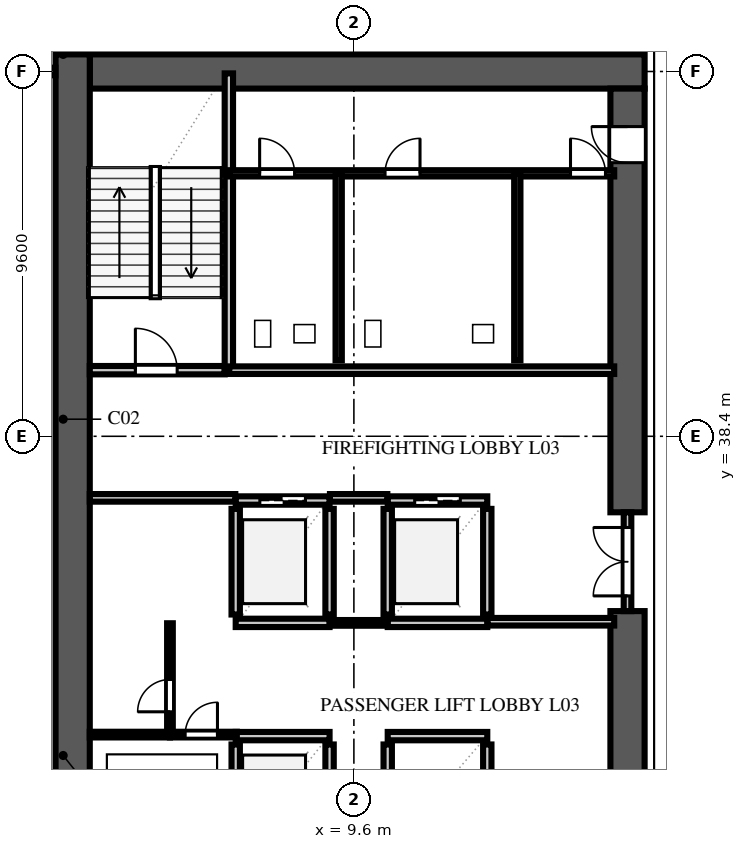
"""IFC4 building model, lengths in metres.
Left out: names, types, materials, properties, quantities, classifications, styles, units other than length and angle.
Written with IfcOpenShell. Run it as: python <this file> out.ifc"""

import sys

from ifc_helpers import new_model, si_unit, direction, frame, frame_2d, origin, place, context, subcontext, project, spatial, rectangle, extrude, element, fill, save


model = new_model("IFC4")
c1 = context("Model", 3, precision=1e-05, world=origin(), true_north=direction((0.0, 1.0)))
c2 = subcontext(c1, "Body", "Model", "MODEL_VIEW")
j1 = project(units=[si_unit("LENGTHUNIT", "METRE"), si_unit("PLANEANGLEUNIT", "RADIAN")], contexts=[c1])
p1 = place(None, origin())
s1 = spatial("IfcSite", under=j1, at=p1, CompositionType="ELEMENT")
p2 = place(p1, origin())
s2 = spatial("IfcBuilding", under=s1, at=p2, CompositionType="ELEMENT")
p3 = place(p2, frame((0.0, 0.0, 15.0)))
s3 = spatial("IfcBuildingStorey", under=s2, at=p3, CompositionType="ELEMENT", Elevation=15.0)
p4 = place(p3, frame((2.65, 48.0, 0.0), z_axis=(0.0, 0.0, 1.0), x_axis=(1.0, 0.0, 0.0)))
e1 = element("IfcWall", 1, at=p4, inside=s3, PredefinedType="SHEAR", context=c2, shape_type="SweptSolid", body=[
    extrude(rectangle(XDim=14.6, YDim=0.9, at=frame_2d((7.3, 0.0))), origin(), (0.0, 0.0, 1.0), 4.26),
])
p5 = place(p3, frame((2.2, 9.15, 0.0), z_axis=(0.0, 0.0, 1.0), x_axis=(0.0, 1.0, 0.0)))
e2 = element("IfcWall", 2, at=p5, inside=s3, PredefinedType="SHEAR", context=c2, shape_type="SweptSolid", body=[
    extrude(rectangle(XDim=39.3, YDim=0.9, at=frame_2d((19.65, 0.0))), origin(), (0.0, 0.0, 1.0), 4.26),
])
p6 = place(p3, frame((16.8, 26.0, 0.0), z_axis=(0.0, 0.0, 1.0), x_axis=(0.0, 1.0, 0.0)))
e3 = element("IfcWall", 3, at=p6, inside=s3, PredefinedType="SHEAR", context=c2, shape_type="SweptSolid", body=[
    extrude(rectangle(XDim=7.8, YDim=0.9, at=frame_2d((3.9, 0.0))), origin(), (0.0, 0.0, 1.0), 4.26),
])
p7 = place(p3, frame((16.8, 36.4, 0.0), z_axis=(0.0, 0.0, 1.0), x_axis=(0.0, 1.0, 0.0)))
e4 = element("IfcWall", 4, at=p7, inside=s3, PredefinedType="SHEAR", context=c2, shape_type="SweptSolid", body=[
    extrude(rectangle(XDim=11.15, YDim=0.9, at=frame_2d((5.575, 0.0))), origin(), (0.0, 0.0, 1.0), 4.26),
])
p8 = place(p7, frame((9.2, 0.0, 0.0)))
e5 = element("IfcOpeningElement", 5, at=p8, cuts=e4, PredefinedType="OPENING", context=c2, shape_type="SweptSolid", body=[
    extrude(rectangle(XDim=0.95, YDim=2.15, at=frame_2d((0.475, 1.075))), frame((0.0, 0.462, 0.0), z_axis=(0.0, -1.0, 0.0), x_axis=(1.0, 0.0, 0.0)), (0.0, 0.0, 1.0), 0.924),
])
p9 = place(p3, frame((2.65, 40.14, 0.0), z_axis=(0.0, 0.0, 1.0), x_axis=(1.0, 0.0, 0.0)))
e6 = element("IfcWall", 6, at=p9, inside=s3, PredefinedType="SOLIDWALL", context=c2, shape_type="SweptSolid", body=[
    extrude(rectangle(XDim=3.55, YDim=0.22, at=frame_2d((1.775, 0.0))), origin(), (0.0, 0.0, 1.0), 4.26),
])
p10 = place(p9, frame((1.2, 0.0, 0.0)))
e7 = element("IfcOpeningElement", 7, at=p10, cuts=e6, PredefinedType="OPENING", context=c2, shape_type="SweptSolid", body=[
    extrude(rectangle(XDim=1.1, YDim=2.2, at=frame_2d((0.55, 1.1))), frame((0.0, 0.122, 0.0), z_axis=(0.0, -1.0, 0.0), x_axis=(1.0, 0.0, 0.0)), (0.0, 0.0, 1.0), 0.244),
])
p11 = place(p3, frame((6.31, 40.14, 0.0), z_axis=(0.0, 0.0, 1.0), x_axis=(0.0, 1.0, 0.0)))
e8 = element("IfcWall", 8, at=p11, inside=s3, PredefinedType="SOLIDWALL", context=c2, shape_type="SweptSolid", body=[
    extrude(rectangle(XDim=7.81, YDim=0.22, at=frame_2d((3.905, 0.0))), origin(), (0.0, 0.0, 1.0), 4.26),
])
p12 = place(p3, frame((6.49, 27.71, 0.0), z_axis=(0.0, 0.0, 1.0), x_axis=(0.0, 1.0, 0.0)))
e9 = element("IfcWall", 9, at=p12, inside=s3, PredefinedType="SOLIDWALL", context=c2, shape_type="SweptSolid", body=[
    extrude(rectangle(XDim=2.58, YDim=0.22, at=frame_2d((1.29, 0.0))), origin(), (0.0, 0.0, 1.0), 4.26),
])
p13 = place(p3, frame((8.96, 27.71, 0.0), z_axis=(0.0, 0.0, 1.0), x_axis=(0.0, 1.0, 0.0)))
e10 = element("IfcWall", 10, at=p13, inside=s3, PredefinedType="SOLIDWALL", context=c2, shape_type="SweptSolid", body=[
    extrude(rectangle(XDim=2.58, YDim=0.22, at=frame_2d((1.29, 0.0))), origin(), (0.0, 0.0, 1.0), 4.26),
])
p14 = place(p13, frame((0.74, 0.0, 0.0)))
e11 = element("IfcOpeningElement", 11, at=p14, cuts=e10, PredefinedType="OPENING", context=c2, shape_type="SweptSolid", body=[
    extrude(rectangle(XDim=1.1, YDim=2.2, at=frame_2d((0.55, 1.1))), frame((0.0, 0.122, 0.0), z_axis=(0.0, -1.0, 0.0), x_axis=(1.0, 0.0, 0.0)), (0.0, 0.0, 1.0), 0.244),
])
p15 = place(p3, frame((6.49, 30.51, 0.0), z_axis=(0.0, 0.0, 1.0), x_axis=(1.0, 0.0, 0.0)))
e12 = element("IfcWall", 12, at=p15, inside=s3, PredefinedType="SOLIDWALL", context=c2, shape_type="SweptSolid", body=[
    extrude(rectangle(XDim=2.47, YDim=0.22, at=frame_2d((1.235, 0.0))), origin(), (0.0, 0.0, 1.0), 4.26),
])
for number, where, z_axis, x_axis in (
    (13, (10.49, 27.71, 0.0), (0.0, 0.0, 1.0), (0.0, 1.0, 0.0)),
    (14, (13.11, 27.71, 0.0), (0.0, 0.0, 1.0), (0.0, 1.0, 0.0)),
):
    element("IfcWall", number, at=place(p3, frame(where, z_axis=z_axis, x_axis=x_axis)), inside=s3, PredefinedType="SOLIDWALL", context=c2, shape_type="SweptSolid", body=[
        extrude(rectangle(XDim=2.58, YDim=0.22, at=frame_2d((1.29, 0.0))), origin(), (0.0, 0.0, 1.0), 4.26),
    ])
p16 = place(p3, frame((10.49, 30.51, 0.0), z_axis=(0.0, 0.0, 1.0), x_axis=(1.0, 0.0, 0.0)))
e15 = element("IfcWall", 15, at=p16, inside=s3, PredefinedType="SOLIDWALL", context=c2, shape_type="SweptSolid", body=[
    extrude(rectangle(XDim=2.62, YDim=0.22, at=frame_2d((1.31, 0.0))), origin(), (0.0, 0.0, 1.0), 4.26),
])
for number, where, z_axis, x_axis in (
    (16, (6.49, 33.71, 0.0), (0.0, 0.0, 1.0), (0.0, 1.0, 0.0)),
    (17, (8.96, 33.71, 0.0), (0.0, 0.0, 1.0), (0.0, 1.0, 0.0)),
):
    element("IfcWall", number, at=place(p3, frame(where, z_axis=z_axis, x_axis=x_axis)), inside=s3, PredefinedType="SOLIDWALL", context=c2, shape_type="SweptSolid", body=[
        extrude(rectangle(XDim=2.78, YDim=0.22, at=frame_2d((1.39, 0.0))), origin(), (0.0, 0.0, 1.0), 4.26),
    ])
p17 = place(p3, frame((6.49, 33.49, 0.0), z_axis=(0.0, 0.0, 1.0), x_axis=(1.0, 0.0, 0.0)))
e18 = element("IfcWall", 18, at=p17, inside=s3, PredefinedType="SOLIDWALL", context=c2, shape_type="SweptSolid", body=[
    extrude(rectangle(XDim=2.47, YDim=0.22, at=frame_2d((1.235, 0.0))), origin(), (0.0, 0.0, 1.0), 4.26),
])
p18 = place(p3, frame((6.49, 36.71, 0.0), z_axis=(0.0, 0.0, 1.0), x_axis=(1.0, 0.0, 0.0)))
e19 = element("IfcWall", 19, at=p18, inside=s3, PredefinedType="SOLIDWALL", context=c2, shape_type="SweptSolid", body=[
    extrude(rectangle(XDim=2.47, YDim=0.22, at=frame_2d((1.235, 0.0))), origin(), (0.0, 0.0, 1.0), 4.26),
])
p19 = place(p18, frame((0.635, 0.0, 0.0)))
e20 = element("IfcOpeningElement", 20, at=p19, cuts=e19, PredefinedType="OPENING", context=c2, shape_type="SweptSolid", body=[
    extrude(rectangle(XDim=1.2, YDim=2.2, at=frame_2d((0.6, 1.1))), frame((0.0, 0.122, 0.0), z_axis=(0.0, -1.0, 0.0), x_axis=(1.0, 0.0, 0.0)), (0.0, 0.0, 1.0), 0.244),
])
for number, where, z_axis, x_axis in (
    (21, (10.49, 33.71, 0.0), (0.0, 0.0, 1.0), (0.0, 1.0, 0.0)),
    (22, (13.11, 33.71, 0.0), (0.0, 0.0, 1.0), (0.0, 1.0, 0.0)),
):
    element("IfcWall", number, at=place(p3, frame(where, z_axis=z_axis, x_axis=x_axis)), inside=s3, PredefinedType="SOLIDWALL", context=c2, shape_type="SweptSolid", body=[
        extrude(rectangle(XDim=2.78, YDim=0.22, at=frame_2d((1.39, 0.0))), origin(), (0.0, 0.0, 1.0), 4.26),
    ])
p20 = place(p3, frame((10.49, 33.49, 0.0), z_axis=(0.0, 0.0, 1.0), x_axis=(1.0, 0.0, 0.0)))
e23 = element("IfcWall", 23, at=p20, inside=s3, PredefinedType="SOLIDWALL", context=c2, shape_type="SweptSolid", body=[
    extrude(rectangle(XDim=2.62, YDim=0.22, at=frame_2d((1.31, 0.0))), origin(), (0.0, 0.0, 1.0), 4.26),
])
p21 = place(p3, frame((10.49, 36.71, 0.0), z_axis=(0.0, 0.0, 1.0), x_axis=(1.0, 0.0, 0.0)))
e24 = element("IfcWall", 24, at=p21, inside=s3, PredefinedType="SOLIDWALL", context=c2, shape_type="SweptSolid", body=[
    extrude(rectangle(XDim=2.62, YDim=0.22, at=frame_2d((1.31, 0.0))), origin(), (0.0, 0.0, 1.0), 4.26),
])
p22 = place(p21, frame((0.71, 0.0, 0.0)))
e25 = element("IfcOpeningElement", 25, at=p22, cuts=e24, PredefinedType="OPENING", context=c2, shape_type="SweptSolid", body=[
    extrude(rectangle(XDim=1.2, YDim=2.2, at=frame_2d((0.6, 1.1))), frame((0.0, 0.122, 0.0), z_axis=(0.0, -1.0, 0.0), x_axis=(1.0, 0.0, 0.0)), (0.0, 0.0, 1.0), 0.244),
])
p23 = place(p3, frame((2.65, 36.78, 0.0), z_axis=(0.0, 0.0, 1.0), x_axis=(1.0, 0.0, 0.0)))
e26 = element("IfcWall", 26, at=p23, inside=s3, PredefinedType="SOLIDWALL", context=c2, shape_type="SweptSolid", body=[
    extrude(rectangle(XDim=3.83, YDim=0.2, at=frame_2d((1.915, 0.0))), origin(), (0.0, 0.0, 1.0), 4.26),
])
p24 = place(p3, frame((8.97, 36.78, 0.0), z_axis=(0.0, 0.0, 1.0), x_axis=(1.0, 0.0, 0.0)))
e27 = element("IfcWall", 27, at=p24, inside=s3, PredefinedType="SOLIDWALL", context=c2, shape_type="SweptSolid", body=[
    extrude(rectangle(XDim=1.51, YDim=0.2, at=frame_2d((0.755, 0.0))), origin(), (0.0, 0.0, 1.0), 4.26),
])
p25 = place(p3, frame((13.12, 33.52, 0.0), z_axis=(0.0, 0.0, 1.0), x_axis=(1.0, 0.0, 0.0)))
e28 = element("IfcWall", 28, at=p25, inside=s3, PredefinedType="SOLIDWALL", context=c2, shape_type="SweptSolid", body=[
    extrude(rectangle(XDim=3.33, YDim=0.2, at=frame_2d((1.665, 0.0))), origin(), (0.0, 0.0, 1.0), 4.26),
])
p26 = place(p3, frame((6.32, 40.14, 0.0), z_axis=(0.0, 0.0, 1.0), x_axis=(1.0, 0.0, 0.0)))
e29 = element("IfcWall", 29, at=p26, inside=s3, PredefinedType="SOLIDWALL", context=c2, shape_type="SweptSolid", body=[
    extrude(rectangle(XDim=10.13, YDim=0.2, at=frame_2d((5.065, 0.0))), origin(), (0.0, 0.0, 1.0), 4.26),
])
p27 = place(p3, frame((16.8, 33.8, 0.0), z_axis=(0.0, 0.0, 1.0), x_axis=(0.0, 1.0, 0.0)))
e30 = element("IfcWall", 30, at=p27, inside=s3, PredefinedType="SOLIDWALL", context=c2, shape_type="SweptSolid", body=[
    extrude(rectangle(XDim=2.6, YDim=0.2, at=frame_2d((1.3, 0.0))), origin(), (0.0, 0.0, 1.0), 4.26),
])
p28 = place(p27, frame((0.4, 0.0, 0.0)))
e31 = element("IfcOpeningElement", 31, at=p28, cuts=e30, PredefinedType="OPENING", context=c2, shape_type="SweptSolid", body=[
    extrude(rectangle(XDim=1.8, YDim=2.2, at=frame_2d((0.9, 1.1))), frame((0.0, 0.112, 0.0), z_axis=(0.0, -1.0, 0.0), x_axis=(1.0, 0.0, 0.0)), (0.0, 0.0, 1.0), 0.224),
])
p29 = place(p3, frame((8.965, 33.49, 0.0), z_axis=(0.0, 0.0, 1.0), x_axis=(1.0, 0.0, 0.0)))
e32 = element("IfcWall", 32, at=p29, inside=s3, PredefinedType="PARTITIONING", context=c2, shape_type="SweptSolid", body=[
    extrude(rectangle(XDim=1.52, YDim=0.15, at=frame_2d((0.76, 0.0))), origin(), (0.0, 0.0, 1.0), 4.26),
])
p30 = place(p3, frame((4.76, 30.55, 0.0), z_axis=(0.0, 0.0, 1.0), x_axis=(0.0, 1.0, 0.0)))
e33 = element("IfcWall", 33, at=p30, inside=s3, PredefinedType="PARTITIONING", context=c2, shape_type="SweptSolid", body=[
    extrude(rectangle(XDim=2.93, YDim=0.15, at=frame_2d((1.465, 0.0))), origin(), (0.0, 0.0, 1.0), 4.26),
])
p31 = place(p30, frame((0.6, 0.0, 0.0)))
e34 = element("IfcOpeningElement", 34, at=p31, cuts=e33, PredefinedType="OPENING", context=c2, shape_type="SweptSolid", body=[
    extrude(rectangle(XDim=0.85, YDim=2.1, at=frame_2d((0.425, 1.05))), frame((0.0, 0.087, 0.0), z_axis=(0.0, -1.0, 0.0), x_axis=(1.0, 0.0, 0.0)), (0.0, 0.0, 1.0), 0.174),
])
p32 = place(p3, frame((4.76, 30.55, 0.0), z_axis=(0.0, 0.0, 1.0), x_axis=(1.0, 0.0, 0.0)))
e35 = element("IfcWall", 35, at=p32, inside=s3, PredefinedType="PARTITIONING", context=c2, shape_type="SweptSolid", body=[
    extrude(rectangle(XDim=1.76, YDim=0.15, at=frame_2d((0.88, 0.0))), origin(), (0.0, 0.0, 1.0), 4.26),
])
p33 = place(p32, frame((0.4, 0.0, 0.0)))
e36 = element("IfcOpeningElement", 36, at=p33, cuts=e35, PredefinedType="OPENING", context=c2, shape_type="SweptSolid", body=[
    extrude(rectangle(XDim=0.85, YDim=2.1, at=frame_2d((0.425, 1.05))), frame((0.0, 0.087, 0.0), z_axis=(0.0, -1.0, 0.0), x_axis=(1.0, 0.0, 0.0)), (0.0, 0.0, 1.0), 0.174),
])
p34 = place(p3, frame((2.65, 30.55, 0.0), z_axis=(0.0, 0.0, 1.0), x_axis=(1.0, 0.0, 0.0)))
e37 = element("IfcWall", 37, at=p34, inside=s3, PredefinedType="PARTITIONING", context=c2, shape_type="SweptSolid", body=[
    extrude(rectangle(XDim=2.11, YDim=0.15, at=frame_2d((1.055, 0.0))), origin(), (0.0, 0.0, 1.0), 4.26),
])
p35 = place(p3, frame((6.32, 45.32, 0.0), z_axis=(0.0, 0.0, 1.0), x_axis=(1.0, 0.0, 0.0)))
e38 = element("IfcWall", 38, at=p35, inside=s3, PredefinedType="PLUMBINGWALL", context=c2, shape_type="SweptSolid", body=[
    extrude(rectangle(XDim=10.13, YDim=0.165, at=frame_2d((5.065, 0.0))), origin(), (0.0, 0.0, 1.0), 4.26),
])
p36 = place(p35, frame((0.8, 0.0, 0.0)))
e39 = element("IfcOpeningElement", 39, at=p36, cuts=e38, PredefinedType="OPENING", context=c2, shape_type="SweptSolid", body=[
    extrude(rectangle(XDim=0.92, YDim=2.15, at=frame_2d((0.46, 1.075))), frame((0.0, 0.094, 0.0), z_axis=(0.0, -1.0, 0.0), x_axis=(1.0, 0.0, 0.0)), (0.0, 0.0, 1.0), 0.189),
])
p37 = place(p35, frame((4.1, 0.0, 0.0)))
e40 = element("IfcOpeningElement", 40, at=p37, cuts=e38, PredefinedType="OPENING", context=c2, shape_type="SweptSolid", body=[
    extrude(rectangle(XDim=0.92, YDim=2.15, at=frame_2d((0.46, 1.075))), frame((0.0, 0.094, 0.0), z_axis=(0.0, -1.0, 0.0), x_axis=(1.0, 0.0, 0.0)), (0.0, 0.0, 1.0), 0.189),
])
p38 = place(p35, frame((8.98, 0.0, 0.0)))
e41 = element("IfcOpeningElement", 41, at=p38, cuts=e38, PredefinedType="OPENING", context=c2, shape_type="SweptSolid", body=[
    extrude(rectangle(XDim=0.92, YDim=2.15, at=frame_2d((0.46, 1.075))), frame((0.0, 0.094, 0.0), z_axis=(0.0, -1.0, 0.0), x_axis=(1.0, 0.0, 0.0)), (0.0, 0.0, 1.0), 0.189),
])
for number, where, z_axis, x_axis in (
    (42, (9.2, 40.4, 0.0), (0.0, 0.0, 1.0), (0.0, 1.0, 0.0)),
    (43, (13.9, 40.4, 0.0), (0.0, 0.0, 1.0), (0.0, 1.0, 0.0)),
):
    element("IfcWall", number, at=place(p3, frame(where, z_axis=z_axis, x_axis=x_axis)), inside=s3, PredefinedType="PLUMBINGWALL", context=c2, shape_type="SweptSolid", body=[
        extrude(rectangle(XDim=4.92, YDim=0.165, at=frame_2d((2.46, 0.0))), origin(), (0.0, 0.0, 1.0), 4.26),
    ])
p39 = place(p3, frame((0.85, 48.0, 0.0), z_axis=(0.0, 0.0, 1.0), x_axis=(1.0, 0.0, 0.0)))
e44 = element("IfcWall", 44, at=p39, inside=s3, PredefinedType="SOLIDWALL", context=c2, shape_type="SweptSolid", body=[
    extrude(rectangle(XDim=0.895, YDim=0.2, at=frame_2d((0.448, 0.0))), origin(), (0.0, 0.0, 1.0), 4.26),
])
p40 = place(p10, origin())
e45 = element("IfcDoor", 45, at=p40, inside=s3, OperationType="SINGLE_SWING_LEFT", PredefinedType="DOOR", context=c2, shape_type="SweptSolid", body=[
    extrude(rectangle(XDim=1.1, YDim=2.2, at=frame_2d((0.55, 1.1))), frame((0.0, 0.025, 0.0), z_axis=(0.0, -1.0, 0.0), x_axis=(1.0, 0.0, 0.0)), (0.0, 0.0, 1.0), 0.05),
])
fill(e7, e45)
p41 = place(p19, origin())
e46 = element("IfcDoor", 46, at=p41, inside=s3, OperationType="DOUBLE_DOOR_SLIDING", PredefinedType="DOOR", context=c2, shape_type="SweptSolid", body=[
    extrude(rectangle(XDim=1.2, YDim=2.2, at=frame_2d((0.6, 1.1))), frame((0.0, 0.025, 0.0), z_axis=(0.0, -1.0, 0.0), x_axis=(1.0, 0.0, 0.0)), (0.0, 0.0, 1.0), 0.05),
])
fill(e20, e46)
p42 = place(p22, origin())
e47 = element("IfcDoor", 47, at=p42, inside=s3, OperationType="DOUBLE_DOOR_SLIDING", PredefinedType="DOOR", context=c2, shape_type="SweptSolid", body=[
    extrude(rectangle(XDim=1.2, YDim=2.2, at=frame_2d((0.6, 1.1))), frame((0.0, 0.025, 0.0), z_axis=(0.0, -1.0, 0.0), x_axis=(1.0, 0.0, 0.0)), (0.0, 0.0, 1.0), 0.05),
])
fill(e25, e47)
p43 = place(p8, origin())
e48 = element("IfcDoor", 48, at=p43, inside=s3, OperationType="SINGLE_SWING_RIGHT", PredefinedType="DOOR", context=c2, shape_type="SweptSolid", body=[
    extrude(rectangle(XDim=0.95, YDim=2.15, at=frame_2d((0.475, 1.075))), frame((0.0, 0.025, 0.0), z_axis=(0.0, -1.0, 0.0), x_axis=(1.0, 0.0, 0.0)), (0.0, 0.0, 1.0), 0.05),
])
fill(e5, e48)
p44 = place(p28, origin())
e49 = element("IfcDoor", 49, at=p44, inside=s3, OperationType="DOUBLE_DOOR_SINGLE_SWING", PredefinedType="DOOR", context=c2, shape_type="SweptSolid", body=[
    extrude(rectangle(XDim=1.8, YDim=2.2, at=frame_2d((0.9, 1.1))), frame((0.0, 0.025, 0.0), z_axis=(0.0, -1.0, 0.0), x_axis=(1.0, 0.0, 0.0)), (0.0, 0.0, 1.0), 0.05),
])
fill(e31, e49)
p45 = place(p31, origin())
e50 = element("IfcDoor", 50, at=p45, inside=s3, OperationType="SINGLE_SWING_LEFT", PredefinedType="DOOR", context=c2, shape_type="SweptSolid", body=[
    extrude(rectangle(XDim=0.85, YDim=2.1, at=frame_2d((0.425, 1.05))), frame((0.0, 0.025, 0.0), z_axis=(0.0, -1.0, 0.0), x_axis=(1.0, 0.0, 0.0)), (0.0, 0.0, 1.0), 0.05),
])
fill(e34, e50)
p46 = place(p33, origin())
e51 = element("IfcDoor", 51, at=p46, inside=s3, OperationType="SINGLE_SWING_RIGHT", PredefinedType="DOOR", context=c2, shape_type="SweptSolid", body=[
    extrude(rectangle(XDim=0.85, YDim=2.1, at=frame_2d((0.425, 1.05))), frame((0.0, 0.025, 0.0), z_axis=(0.0, -1.0, 0.0), x_axis=(1.0, 0.0, 0.0)), (0.0, 0.0, 1.0), 0.05),
])
fill(e36, e51)
p47 = place(p36, origin())
e52 = element("IfcDoor", 52, at=p47, inside=s3, OperationType="SINGLE_SWING_LEFT", PredefinedType="DOOR", context=c2, shape_type="SweptSolid", body=[
    extrude(rectangle(XDim=0.92, YDim=2.15, at=frame_2d((0.46, 1.075))), frame((0.0, 0.025, 0.0), z_axis=(0.0, -1.0, 0.0), x_axis=(1.0, 0.0, 0.0)), (0.0, 0.0, 1.0), 0.05),
])
fill(e39, e52)
p48 = place(p37, origin())
e53 = element("IfcDoor", 53, at=p48, inside=s3, OperationType="SINGLE_SWING_RIGHT", PredefinedType="DOOR", context=c2, shape_type="SweptSolid", body=[
    extrude(rectangle(XDim=0.92, YDim=2.15, at=frame_2d((0.46, 1.075))), frame((0.0, 0.025, 0.0), z_axis=(0.0, -1.0, 0.0), x_axis=(1.0, 0.0, 0.0)), (0.0, 0.0, 1.0), 0.05),
])
fill(e40, e53)
p49 = place(p38, origin())
e54 = element("IfcDoor", 54, at=p49, inside=s3, OperationType="SINGLE_SWING_LEFT", PredefinedType="DOOR", context=c2, shape_type="SweptSolid", body=[
    extrude(rectangle(XDim=0.92, YDim=2.15, at=frame_2d((0.46, 1.075))), frame((0.0, 0.025, 0.0), z_axis=(0.0, -1.0, 0.0), x_axis=(1.0, 0.0, 0.0)), (0.0, 0.0, 1.0), 0.05),
])
fill(e41, e54)
save(model, sys.argv[1])
